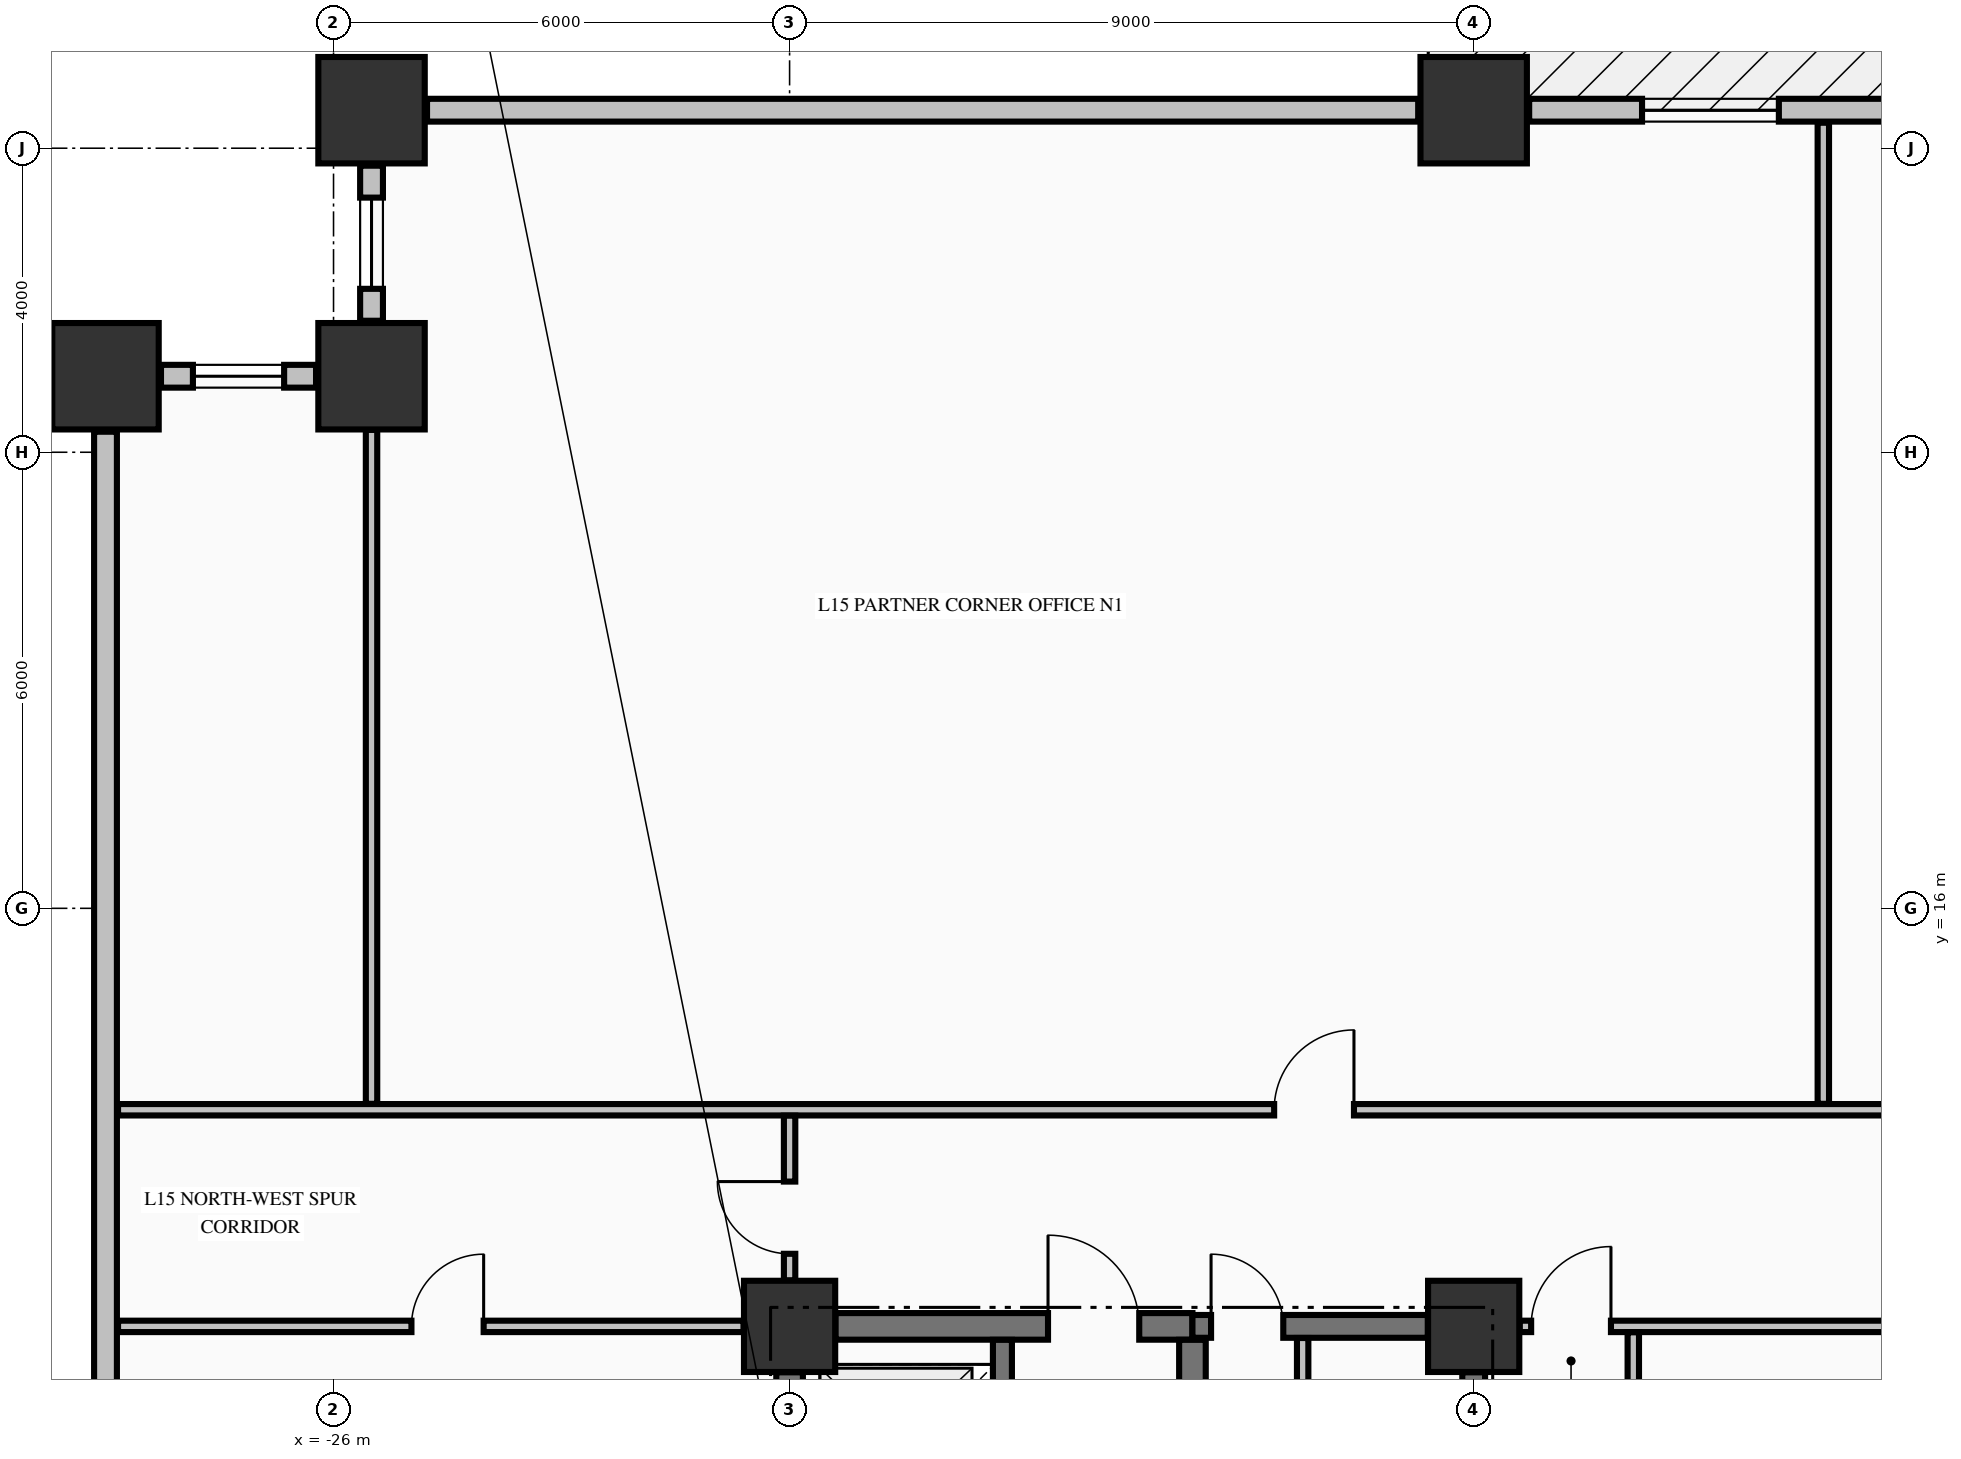
"""IFC4 building model, lengths in metres.
Left out: names, types, materials, properties, quantities, classifications, styles, units other than length and angle.
Written with IfcOpenShell. Run it as: python <this file> out.ifc"""

import sys

from ifc_helpers import new_model, si_unit, direction, frame, frame_2d, origin, origin_2d, place, context, subcontext, project, spatial, rectangle, extrude, element, fill, save


model = new_model("IFC4")
c1 = context("Model", 3, precision=1e-05, world=origin(), true_north=direction((0.0, 1.0)))
c2 = subcontext(c1, "Body", "Model", "MODEL_VIEW")
j1 = project(units=[si_unit("LENGTHUNIT", "METRE"), si_unit("PLANEANGLEUNIT", "RADIAN")], contexts=[c1])
p1 = place(None, origin())
s1 = spatial("IfcSite", under=j1, at=p1, CompositionType="ELEMENT")
p2 = place(p1, origin())
s2 = spatial("IfcBuilding", under=s1, at=p2, CompositionType="ELEMENT")
p3 = place(p2, frame((0.0, 0.0, 64.33)))
s3 = spatial("IfcBuildingStorey", under=s2, at=p3, CompositionType="ELEMENT", Elevation=64.33)
for number, where, z_axis, x_axis in (
    (1, (-25.5, 26.5, -0.25), (0.0, 0.0, 1.0), (1.0, 0.0, 0.0)),
    (2, (-11.0, 26.5, -0.25), (0.0, 0.0, 1.0), (1.0, 0.0, 0.0)),
    (3, (-29.0, 23.0, -0.25), (0.0, 0.0, 1.0), (1.0, 0.0, 0.0)),
    (4, (-25.5, 23.0, -0.25), (0.0, 0.0, 1.0), (1.0, 0.0, 0.0)),
):
    element("IfcColumn", number, at=place(p3, frame(where, z_axis=z_axis, x_axis=x_axis)), inside=s3, PredefinedType="COLUMN", context=c2, shape_type="SweptSolid", body=[
        extrude(rectangle(XDim=1.4, YDim=1.4, at=origin_2d()), origin(), (0.0, 0.0, 1.0), 3.57),
    ])
for number, where, z_axis, x_axis in (
    (5, (-20.0, 10.5, -0.25), (0.0, 0.0, 1.0), (1.0, 0.0, 0.0)),
    (6, (-11.0, 10.5, -0.25), (0.0, 0.0, 1.0), (1.0, 0.0, 0.0)),
):
    element("IfcColumn", number, at=place(p3, frame(where, z_axis=z_axis, x_axis=x_axis)), inside=s3, PredefinedType="COLUMN", context=c2, shape_type="SweptSolid", body=[
        extrude(rectangle(XDim=1.2, YDim=1.2, at=origin_2d()), origin(), (0.0, 0.0, 1.0), 3.57),
    ])
p4 = place(p3, frame((-25.5, 25.77, 0.0), z_axis=(0.0, 0.0, 1.0), x_axis=(0.0, -1.0, 0.0)))
e7 = element("IfcWall", 7, at=p4, inside=s3, PredefinedType="STANDARD", context=c2, shape_type="SweptSolid", body=[
    extrude(rectangle(XDim=2.04, YDim=0.3, at=frame_2d((1.02, 0.0))), origin(), (0.0, 0.0, 1.0), 2.712),
])
p5 = place(p4, frame((0.42, 0.0, 0.82)))
e8 = element("IfcOpeningElement", 8, at=p5, cuts=e7, PredefinedType="OPENING", context=c2, shape_type="SweptSolid", body=[
    extrude(rectangle(XDim=1.2, YDim=1.65, at=frame_2d((0.6, 0.825))), frame((0.0, 0.16, 0.0), z_axis=(0.0, -1.0, 0.0), x_axis=(1.0, 0.0, 0.0)), (0.0, 0.0, 1.0), 0.32),
])
p6 = place(p3, frame((-26.23, 23.0, 0.0), z_axis=(0.0, 0.0, 1.0), x_axis=(-1.0, 0.0, 0.0)))
e9 = element("IfcWall", 9, at=p6, inside=s3, PredefinedType="STANDARD", context=c2, shape_type="SweptSolid", body=[
    extrude(rectangle(XDim=2.04, YDim=0.3, at=frame_2d((1.02, 0.0))), origin(), (0.0, 0.0, 1.0), 2.712),
])
p7 = place(p6, frame((0.42, 0.0, 0.82)))
e10 = element("IfcOpeningElement", 10, at=p7, cuts=e9, PredefinedType="OPENING", context=c2, shape_type="SweptSolid", body=[
    extrude(rectangle(XDim=1.2, YDim=1.65, at=frame_2d((0.6, 0.825))), frame((0.0, 0.16, 0.0), z_axis=(0.0, -1.0, 0.0), x_axis=(1.0, 0.0, 0.0)), (0.0, 0.0, 1.0), 0.32),
])
p8 = place(p3, frame((-11.73, 26.5, 0.0), z_axis=(0.0, 0.0, 1.0), x_axis=(-1.0, 0.0, 0.0)))
e11 = element("IfcWall", 11, at=p8, inside=s3, PredefinedType="STANDARD", context=c2, shape_type="SweptSolid", body=[
    extrude(rectangle(XDim=13.04, YDim=0.3, at=frame_2d((6.52, 0.0))), origin(), (0.0, 0.0, 1.0), 2.712),
])
p9 = place(p3, frame((-0.73, 26.5, 0.0), z_axis=(0.0, 0.0, 1.0), x_axis=(-1.0, 0.0, 0.0)))
e12 = element("IfcWall", 12, at=p9, inside=s3, PredefinedType="STANDARD", context=c2, shape_type="SweptSolid", body=[
    extrude(rectangle(XDim=9.54, YDim=0.3, at=frame_2d((4.77, 0.0))), origin(), (0.0, 0.0, 1.0), 2.712),
])
p10 = place(p9, frame((0.2, 0.0, 0.0)))
e13 = element("IfcOpeningElement", 13, at=p10, cuts=e12, PredefinedType="OPENING", context=c2, shape_type="SweptSolid", body=[
    extrude(rectangle(XDim=1.1, YDim=2.15, at=frame_2d((0.55, 1.075))), frame((0.0, 0.16, 0.0), z_axis=(0.0, -1.0, 0.0), x_axis=(1.0, 0.0, 0.0)), (0.0, 0.0, 1.0), 0.32),
])
p11 = place(p9, frame((6.255, 0.0, 0.78)))
e14 = element("IfcOpeningElement", 14, at=p11, cuts=e12, PredefinedType="OPENING", context=c2, shape_type="SweptSolid", body=[
    extrude(rectangle(XDim=1.8, YDim=1.72, at=frame_2d((0.9, 0.86))), frame((0.0, 0.16, 0.0), z_axis=(0.0, -1.0, 0.0), x_axis=(1.0, 0.0, 0.0)), (0.0, 0.0, 1.0), 0.32),
])
p12 = place(p3, frame((-29.0, 22.27, 0.0), z_axis=(0.0, 0.0, 1.0), x_axis=(0.0, -1.0, 0.0)))
e15 = element("IfcWall", 15, at=p12, inside=s3, PredefinedType="STANDARD", context=c2, shape_type="SweptSolid", body=[
    extrude(rectangle(XDim=12.54, YDim=0.3, at=frame_2d((6.27, 0.0))), origin(), (0.0, 0.0, 1.0), 2.712),
])
p13 = place(p3, frame((-19.396, 10.5, 0.0), z_axis=(0.0, 0.0, 1.0), x_axis=(1.0, 0.0, 0.0)))
e16 = element("IfcWall", 16, at=p13, inside=s3, PredefinedType="SHEAR", context=c2, shape_type="SweptSolid", body=[
    extrude(rectangle(XDim=4.696, YDim=0.35, at=frame_2d((2.348, 0.0))), origin(), (0.0, 0.0, 1.0), 3.32),
])
p14 = place(p13, frame((2.796, 0.0, 0.0)))
e17 = element("IfcOpeningElement", 17, at=p14, cuts=e16, PredefinedType="OPENING", context=c2, shape_type="SweptSolid", body=[
    extrude(rectangle(XDim=1.2, YDim=2.15, at=frame_2d((0.6, 1.075))), frame((0.0, 0.185, 0.0), z_axis=(0.0, -1.0, 0.0), x_axis=(1.0, 0.0, 0.0)), (0.0, 0.0, 1.0), 0.37),
])
p15 = place(p3, frame((-14.7, 10.5, 0.0), z_axis=(0.0, 0.0, 1.0), x_axis=(1.0, 0.0, 0.0)))
e18 = element("IfcWall", 18, at=p15, inside=s3, PredefinedType="SHEAR", context=c2, shape_type="SweptSolid", body=[
    extrude(rectangle(XDim=3.096, YDim=0.3, at=frame_2d((1.548, 0.0))), origin(), (0.0, 0.0, 1.0), 3.32),
])
p16 = place(p15, frame((0.245, 0.0, 0.0)))
e19 = element("IfcOpeningElement", 19, at=p16, cuts=e18, PredefinedType="OPENING", context=c2, shape_type="SweptSolid", body=[
    extrude(rectangle(XDim=0.95, YDim=2.15, at=frame_2d((0.475, 1.075))), frame((0.0, 0.16, 0.0), z_axis=(0.0, -1.0, 0.0), x_axis=(1.0, 0.0, 0.0)), (0.0, 0.0, 1.0), 0.32),
])
p17 = place(p3, frame((-28.835, 10.5, 0.0), z_axis=(0.0, 0.0, 1.0), x_axis=(1.0, 0.0, 0.0)))
e20 = element("IfcWall", 20, at=p17, inside=s3, PredefinedType="PARTITIONING", context=c2, shape_type="SweptSolid", body=[
    extrude(rectangle(XDim=8.229, YDim=0.15, at=frame_2d((4.115, 0.0))), origin(), (0.0, 0.0, 1.0), 3.32),
])
p18 = place(p17, frame((3.86, 0.0, 0.0)))
e21 = element("IfcOpeningElement", 21, at=p18, cuts=e20, PredefinedType="OPENING", context=c2, shape_type="SweptSolid", body=[
    extrude(rectangle(XDim=0.95, YDim=2.15, at=frame_2d((0.475, 1.075))), frame((0.0, 0.085, 0.0), z_axis=(0.0, -1.0, 0.0), x_axis=(1.0, 0.0, 0.0)), (0.0, 0.0, 1.0), 0.17),
])
p19 = place(p3, frame((-10.394, 10.5, 0.0), z_axis=(0.0, 0.0, 1.0), x_axis=(1.0, 0.0, 0.0)))
e22 = element("IfcWall", 22, at=p19, inside=s3, PredefinedType="PARTITIONING", context=c2, shape_type="SweptSolid", body=[
    extrude(rectangle(XDim=20.788, YDim=0.15, at=frame_2d((10.394, 0.0))), origin(), (0.0, 0.0, 1.0), 3.32),
])
p20 = place(p19, frame((0.15, 0.0, 0.0)))
e23 = element("IfcOpeningElement", 23, at=p20, cuts=e22, PredefinedType="OPENING", context=c2, shape_type="SweptSolid", body=[
    extrude(rectangle(XDim=1.05, YDim=2.15, at=frame_2d((0.525, 1.075))), frame((0.0, 0.085, 0.0), z_axis=(0.0, -1.0, 0.0), x_axis=(1.0, 0.0, 0.0)), (0.0, 0.0, 1.0), 0.17),
])
p21 = place(p19, frame((19.588, 0.0, 0.0)))
e24 = element("IfcOpeningElement", 24, at=p21, cuts=e22, PredefinedType="OPENING", context=c2, shape_type="SweptSolid", body=[
    extrude(rectangle(XDim=1.05, YDim=2.15, at=frame_2d((0.525, 1.075))), frame((0.0, 0.085, 0.0), z_axis=(0.0, -1.0, 0.0), x_axis=(1.0, 0.0, 0.0)), (0.0, 0.0, 1.0), 0.17),
])
p22 = place(p3, frame((-28.835, 13.35, 0.0), z_axis=(0.0, 0.0, 1.0), x_axis=(1.0, 0.0, 0.0)))
e25 = element("IfcWall", 25, at=p22, inside=s3, PredefinedType="PARTITIONING", context=c2, shape_type="SweptSolid", body=[
    extrude(rectangle(XDim=52.67, YDim=0.15, at=frame_2d((26.335, 0.0))), origin(), (0.0, 0.0, 1.0), 3.32),
])
p23 = place(p22, frame((15.21, 0.0, 0.0)))
e26 = element("IfcOpeningElement", 26, at=p23, cuts=e25, PredefinedType="OPENING", context=c2, shape_type="SweptSolid", body=[
    extrude(rectangle(XDim=1.05, YDim=2.15, at=frame_2d((0.525, 1.075))), frame((0.0, 0.085, 0.0), z_axis=(0.0, -1.0, 0.0), x_axis=(1.0, 0.0, 0.0)), (0.0, 0.0, 1.0), 0.17),
])
p24 = place(p22, frame((31.26, 0.0, 0.0)))
e27 = element("IfcOpeningElement", 27, at=p24, cuts=e25, PredefinedType="OPENING", context=c2, shape_type="SweptSolid", body=[
    extrude(rectangle(XDim=1.05, YDim=2.15, at=frame_2d((0.525, 1.075))), frame((0.0, 0.085, 0.0), z_axis=(0.0, -1.0, 0.0), x_axis=(1.0, 0.0, 0.0)), (0.0, 0.0, 1.0), 0.17),
])
p25 = place(p22, frame((34.56, 0.0, 0.0)))
e28 = element("IfcOpeningElement", 28, at=p25, cuts=e25, PredefinedType="OPENING", context=c2, shape_type="SweptSolid", body=[
    extrude(rectangle(XDim=1.05, YDim=2.15, at=frame_2d((0.525, 1.075))), frame((0.0, 0.085, 0.0), z_axis=(0.0, -1.0, 0.0), x_axis=(1.0, 0.0, 0.0)), (0.0, 0.0, 1.0), 0.17),
])
p26 = place(p3, frame((-20.0, 7.727, 0.0), z_axis=(0.0, 0.0, 1.0), x_axis=(0.0, 1.0, 0.0)))
e29 = element("IfcWall", 29, at=p26, inside=s3, PredefinedType="SHEAR", context=c2, shape_type="SweptSolid", body=[
    extrude(rectangle(XDim=2.169, YDim=0.35, at=frame_2d((1.084, 0.0))), origin(), (0.0, 0.0, 1.0), 3.32),
])
p27 = place(p3, frame((-17.2, 7.727, 0.0), z_axis=(0.0, 0.0, 1.0), x_axis=(0.0, 1.0, 0.0)))
e30 = element("IfcWall", 30, at=p27, inside=s3, PredefinedType="SOLIDWALL", context=c2, shape_type="SweptSolid", body=[
    extrude(rectangle(XDim=2.596, YDim=0.25, at=frame_2d((1.298, 0.0))), origin(), (0.0, 0.0, 1.0), 3.32),
])
p28 = place(p27, frame((0.773, 0.0, 0.0)))
e31 = element("IfcOpeningElement", 31, at=p28, cuts=e30, PredefinedType="OPENING", context=c2, shape_type="SweptSolid", body=[
    extrude(rectangle(XDim=1.1, YDim=2.2, at=frame_2d((0.55, 1.1))), frame((0.0, 0.135, 0.0), z_axis=(0.0, -1.0, 0.0), x_axis=(1.0, 0.0, 0.0)), (0.0, 0.0, 1.0), 0.27),
])
p29 = place(p3, frame((-14.7, 5.852, 0.0), z_axis=(0.0, 0.0, 1.0), x_axis=(0.0, 1.0, 0.0)))
e32 = element("IfcWall", 32, at=p29, inside=s3, PredefinedType="SHEAR", context=c2, shape_type="SweptSolid", body=[
    extrude(rectangle(XDim=4.471, YDim=0.35, at=frame_2d((2.235, 0.0))), origin(), (0.0, 0.0, 1.0), 3.32),
])
p30 = place(p3, frame((-11.0, 5.852, 0.0), z_axis=(0.0, 0.0, 1.0), x_axis=(0.0, 1.0, 0.0)))
e33 = element("IfcWall", 33, at=p30, inside=s3, PredefinedType="SHEAR", context=c2, shape_type="SweptSolid", body=[
    extrude(rectangle(XDim=4.044, YDim=0.3, at=frame_2d((2.022, 0.0))), origin(), (0.0, 0.0, 1.0), 3.32),
])
p31 = place(p3, frame((-25.5, 13.428, 0.0), z_axis=(0.0, 0.0, 1.0), x_axis=(0.0, 1.0, 0.0)))
e34 = element("IfcWall", 34, at=p31, inside=s3, PredefinedType="PARTITIONING", context=c2, shape_type="SweptSolid", body=[
    extrude(rectangle(XDim=8.866, YDim=0.15, at=frame_2d((4.433, 0.0))), origin(), (0.0, 0.0, 1.0), 3.32),
])
p32 = place(p3, frame((-20.0, 11.106, 0.0), z_axis=(0.0, 0.0, 1.0), x_axis=(0.0, 1.0, 0.0)))
e35 = element("IfcWall", 35, at=p32, inside=s3, PredefinedType="PARTITIONING", context=c2, shape_type="SweptSolid", body=[
    extrude(rectangle(XDim=2.166, YDim=0.15, at=frame_2d((1.083, 0.0))), origin(), (0.0, 0.0, 1.0), 2.66),
])
p33 = place(p32, frame((0.349, 0.0, 0.0)))
e36 = element("IfcOpeningElement", 36, at=p33, cuts=e35, PredefinedType="OPENING", context=c2, shape_type="SweptSolid", body=[
    extrude(rectangle(XDim=0.95, YDim=2.15, at=frame_2d((0.475, 1.075))), frame((0.0, 0.085, 0.0), z_axis=(0.0, -1.0, 0.0), x_axis=(1.0, 0.0, 0.0)), (0.0, 0.0, 1.0), 0.17),
])
p34 = place(p3, frame((-13.25, 5.853, 0.0), z_axis=(0.0, 0.0, 1.0), x_axis=(0.0, 1.0, 0.0)))
e37 = element("IfcWall", 37, at=p34, inside=s3, PredefinedType="PARTITIONING", context=c2, shape_type="SweptSolid", body=[
    extrude(rectangle(XDim=4.494, YDim=0.15, at=frame_2d((2.247, 0.0))), origin(), (0.0, 0.0, 1.0), 3.32),
])
p35 = place(p34, frame((1.472, 0.0, 0.0)))
e38 = element("IfcOpeningElement", 38, at=p35, cuts=e37, PredefinedType="OPENING", context=c2, shape_type="SweptSolid", body=[
    extrude(rectangle(XDim=0.95, YDim=2.15, at=frame_2d((0.475, 1.075))), frame((0.0, 0.085, 0.0), z_axis=(0.0, -1.0, 0.0), x_axis=(1.0, 0.0, 0.0)), (0.0, 0.0, 1.0), 0.17),
])
p36 = place(p3, frame((-8.9, 2.303, 0.0), z_axis=(0.0, 0.0, 1.0), x_axis=(0.0, 1.0, 0.0)))
e39 = element("IfcWall", 39, at=p36, inside=s3, PredefinedType="PARTITIONING", context=c2, shape_type="SweptSolid", body=[
    extrude(rectangle(XDim=8.119, YDim=0.15, at=frame_2d((4.06, 0.0))), origin(), (0.0, 0.0, 1.0), 3.32),
])
p37 = place(p36, frame((3.522, 0.0, 0.0)))
e40 = element("IfcOpeningElement", 40, at=p37, cuts=e39, PredefinedType="OPENING", context=c2, shape_type="SweptSolid", body=[
    extrude(rectangle(XDim=1.05, YDim=2.15, at=frame_2d((0.525, 1.075))), frame((0.0, 0.085, 0.0), z_axis=(0.0, -1.0, 0.0), x_axis=(1.0, 0.0, 0.0)), (0.0, 0.0, 1.0), 0.17),
])
p38 = place(p3, frame((-6.4, 13.428, 0.0), z_axis=(0.0, 0.0, 1.0), x_axis=(0.0, 1.0, 0.0)))
e41 = element("IfcWall", 41, at=p38, inside=s3, PredefinedType="PARTITIONING", context=c2, shape_type="SweptSolid", body=[
    extrude(rectangle(XDim=12.907, YDim=0.15, at=frame_2d((6.454, 0.0))), origin(), (0.0, 0.0, 1.0), 3.32),
])
p39 = place(p5, origin())
e42 = element("IfcWindow", 42, at=p39, inside=s3, PartitioningType="SINGLE_PANEL", PredefinedType="WINDOW", context=c2, shape_type="SweptSolid", body=[
    extrude(rectangle(XDim=1.2, YDim=1.65, at=frame_2d((0.6, 0.825))), frame((0.0, 0.03, 0.0), z_axis=(0.0, -1.0, 0.0), x_axis=(1.0, 0.0, 0.0)), (0.0, 0.0, 1.0), 0.06),
])
fill(e8, e42)
p40 = place(p7, origin())
e43 = element("IfcWindow", 43, at=p40, inside=s3, PartitioningType="SINGLE_PANEL", PredefinedType="WINDOW", context=c2, shape_type="SweptSolid", body=[
    extrude(rectangle(XDim=1.2, YDim=1.65, at=frame_2d((0.6, 0.825))), frame((0.0, 0.03, 0.0), z_axis=(0.0, -1.0, 0.0), x_axis=(1.0, 0.0, 0.0)), (0.0, 0.0, 1.0), 0.06),
])
fill(e10, e43)
p41 = place(p11, origin())
e44 = element("IfcWindow", 44, at=p41, inside=s3, PartitioningType="SINGLE_PANEL", PredefinedType="WINDOW", context=c2, shape_type="SweptSolid", body=[
    extrude(rectangle(XDim=1.8, YDim=1.72, at=frame_2d((0.9, 0.86))), frame((0.0, 0.03, 0.0), z_axis=(0.0, -1.0, 0.0), x_axis=(1.0, 0.0, 0.0)), (0.0, 0.0, 1.0), 0.06),
])
fill(e14, e44)
p42 = place(p16, origin())
e45 = element("IfcDoor", 45, at=p42, inside=s3, OperationType="SINGLE_SWING_LEFT", PredefinedType="DOOR", context=c2, shape_type="SweptSolid", body=[
    extrude(rectangle(XDim=0.95, YDim=2.15, at=frame_2d((0.475, 1.075))), frame((0.0, 0.025, 0.0), z_axis=(0.0, -1.0, 0.0), x_axis=(1.0, 0.0, 0.0)), (0.0, 0.0, 1.0), 0.05),
])
fill(e19, e45)
p43 = place(p14, origin())
e46 = element("IfcDoor", 46, at=p43, inside=s3, OperationType="SINGLE_SWING_LEFT", PredefinedType="DOOR", context=c2, shape_type="SweptSolid", body=[
    extrude(rectangle(XDim=1.2, YDim=2.15, at=frame_2d((0.6, 1.075))), frame((0.0, 0.025, 0.0), z_axis=(0.0, -1.0, 0.0), x_axis=(1.0, 0.0, 0.0)), (0.0, 0.0, 1.0), 0.05),
])
fill(e17, e46)
p44 = place(p20, origin())
e47 = element("IfcDoor", 47, at=p44, inside=s3, OperationType="SINGLE_SWING_RIGHT", PredefinedType="DOOR", context=c2, shape_type="SweptSolid", body=[
    extrude(rectangle(XDim=1.05, YDim=2.15, at=frame_2d((0.525, 1.075))), frame((0.0, 0.025, 0.0), z_axis=(0.0, -1.0, 0.0), x_axis=(1.0, 0.0, 0.0)), (0.0, 0.0, 1.0), 0.05),
])
fill(e23, e47)
p45 = place(p23, origin())
e48 = element("IfcDoor", 48, at=p45, inside=s3, OperationType="SINGLE_SWING_RIGHT", PredefinedType="DOOR", context=c2, shape_type="SweptSolid", body=[
    extrude(rectangle(XDim=1.05, YDim=2.15, at=frame_2d((0.525, 1.075))), frame((0.0, 0.025, 0.0), z_axis=(0.0, -1.0, 0.0), x_axis=(1.0, 0.0, 0.0)), (0.0, 0.0, 1.0), 0.05),
])
fill(e26, e48)
p46 = place(p33, origin())
e49 = element("IfcDoor", 49, at=p46, inside=s3, OperationType="SINGLE_SWING_RIGHT", PredefinedType="DOOR", context=c2, shape_type="SweptSolid", body=[
    extrude(rectangle(XDim=0.95, YDim=2.15, at=frame_2d((0.475, 1.075))), frame((0.0, 0.025, 0.0), z_axis=(0.0, -1.0, 0.0), x_axis=(1.0, 0.0, 0.0)), (0.0, 0.0, 1.0), 0.05),
])
fill(e36, e49)
p47 = place(p18, origin())
e50 = element("IfcDoor", 50, at=p47, inside=s3, OperationType="SINGLE_SWING_RIGHT", PredefinedType="DOOR", context=c2, shape_type="SweptSolid", body=[
    extrude(rectangle(XDim=0.95, YDim=2.15, at=frame_2d((0.475, 1.075))), frame((0.0, 0.025, 0.0), z_axis=(0.0, -1.0, 0.0), x_axis=(1.0, 0.0, 0.0)), (0.0, 0.0, 1.0), 0.05),
])
fill(e21, e50)
save(model, sys.argv[1])
